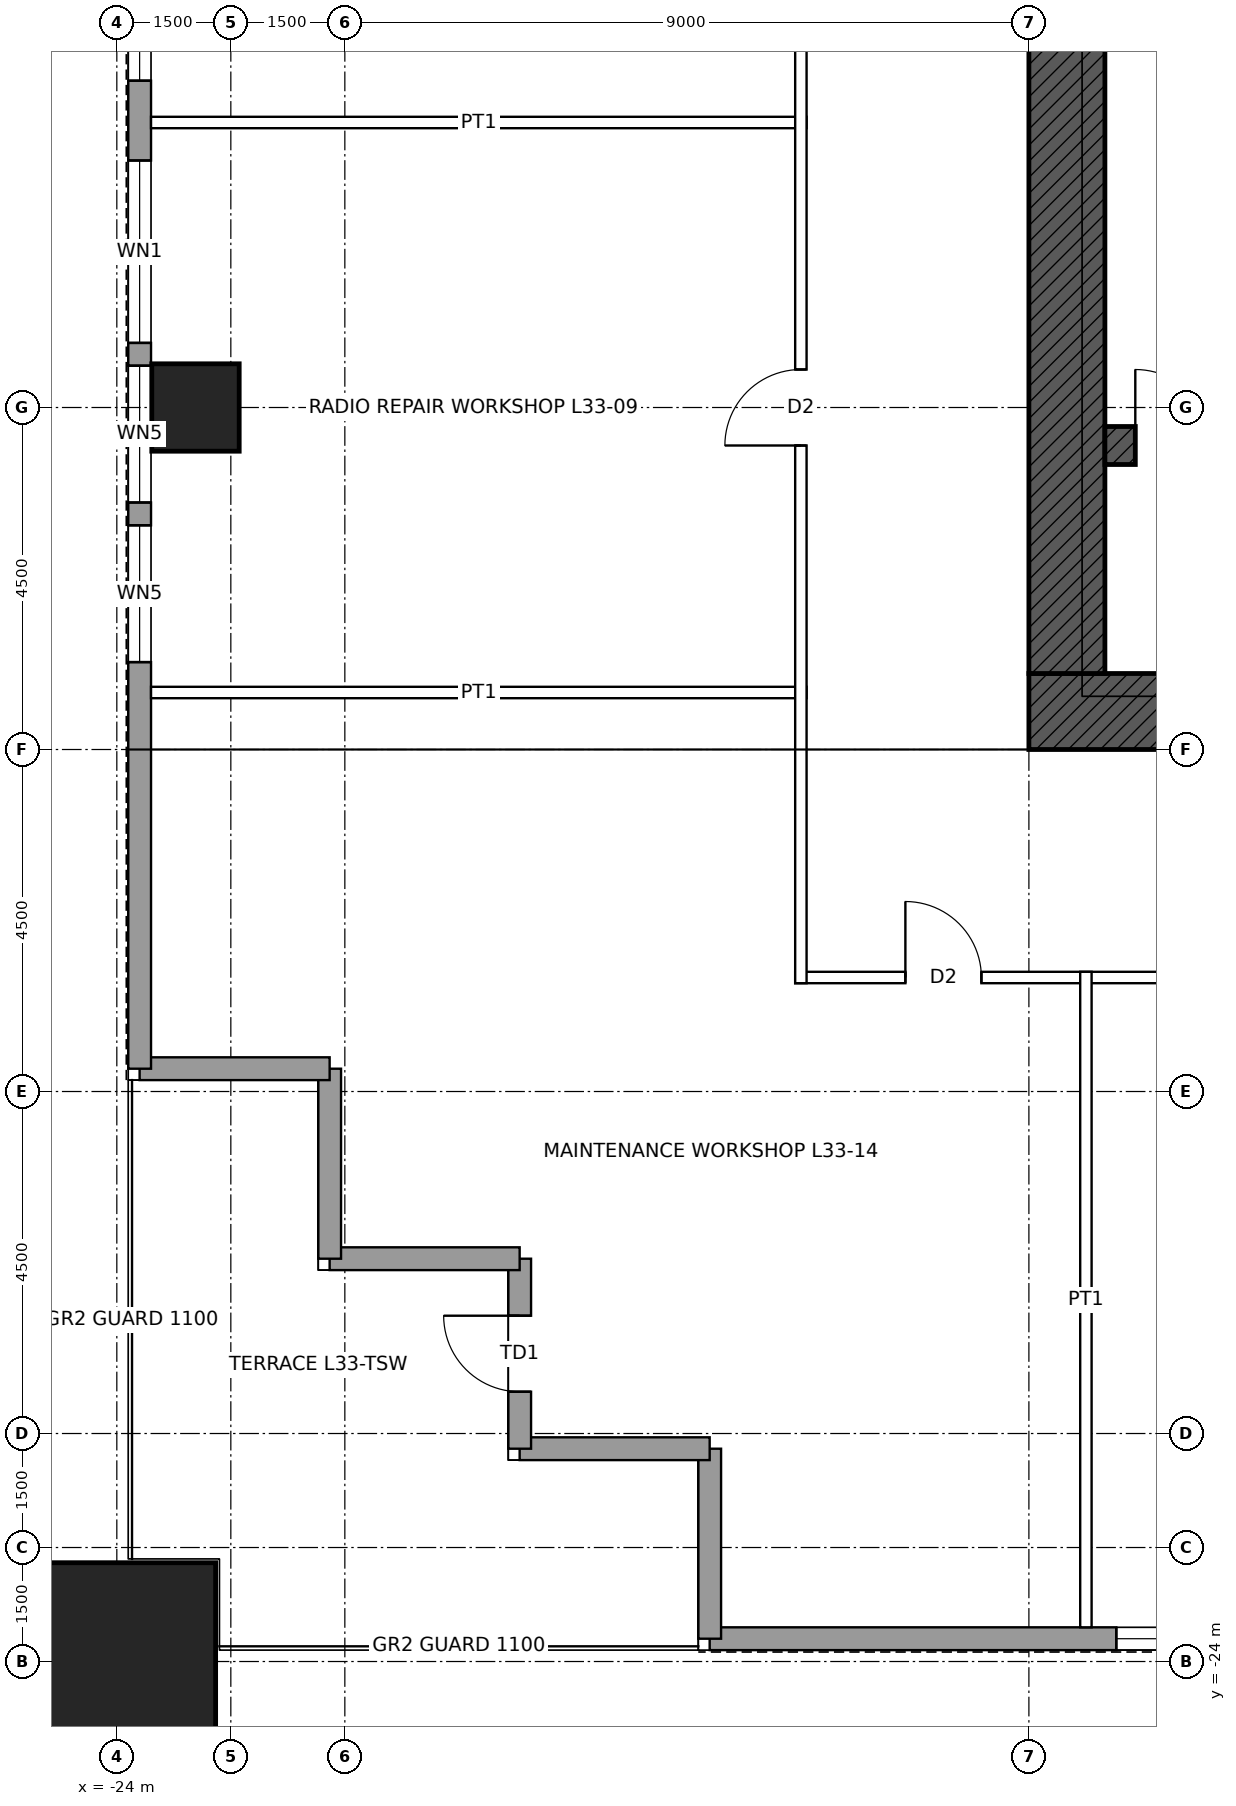
"""IFC4 building model, lengths in metres.
Left out: names, types, materials, properties, quantities, classifications, styles, units other than length and angle.
Written with IfcOpenShell. Run it as: python <this file> out.ifc"""

import sys

from ifc_helpers import new_model, si_unit, direction, frame, frame_2d, origin, origin_2d, place, context, subcontext, project, spatial, rectangle, hollow_rectangle, extrude, element, fill, save


model = new_model("IFC4")
c1 = context("Model", 3, precision=1e-05, world=origin(), true_north=direction((0.0, 1.0)))
c2 = subcontext(c1, "Body", "Model", "MODEL_VIEW")
j1 = project(units=[si_unit("LENGTHUNIT", "METRE"), si_unit("PLANEANGLEUNIT", "RADIAN")], contexts=[c1])
p1 = place(None, origin())
s1 = spatial("IfcSite", under=j1, at=p1, CompositionType="ELEMENT")
p2 = place(p1, origin())
s2 = spatial("IfcBuilding", under=s1, at=p2, CompositionType="ELEMENT")
p3 = place(p2, frame((0.0, 0.0, 162.9)))
s3 = spatial("IfcBuildingStorey", under=s2, at=p3, CompositionType="ELEMENT", Elevation=162.9)
p4 = place(p3, frame((-24.0, -24.0, 0.0), z_axis=(0.0, 0.0, 1.0), x_axis=(1.0, 0.0, 0.0)))
e1 = element("IfcColumn", 1, at=p4, inside=s3, PredefinedType="COLUMN", context=c2, shape_type="SweptSolid", body=[
    extrude(hollow_rectangle(XDim=2.6, YDim=2.6, WallThickness=0.13, at=origin_2d()), origin(), (0.0, 0.0, 1.0), 4.5),
])
p5 = place(p3, frame((-22.965, -7.5, 0.0), z_axis=(0.0, 0.0, 1.0), x_axis=(1.0, 0.0, 0.0)))
e2 = element("IfcColumn", 2, at=p5, inside=s3, PredefinedType="COLUMN", context=c2, shape_type="SweptSolid", body=[
    extrude(hollow_rectangle(XDim=1.15, YDim=1.15, WallThickness=0.075, at=origin_2d()), origin(), (0.0, 0.0, 1.0), 4.5),
])
p6 = place(p3, frame((12.0, -11.5, 0.0), z_axis=(0.0, 0.0, 1.0), x_axis=(-1.0, 0.0, 0.0)))
e3 = element("IfcWall", 3, at=p6, inside=s3, PredefinedType="SHEAR", context=c2, shape_type="SweptSolid", body=[
    extrude(rectangle(XDim=24.0, YDim=1.0, at=frame_2d((12.0, 0.0))), origin(), (0.0, 0.0, 1.0), 4.5),
])
p7 = place(p6, frame((11.5, 0.0, 0.0)))
e4 = element("IfcOpeningElement", 4, at=p7, cuts=e3, PredefinedType="OPENING", context=c2, shape_type="SweptSolid", body=[
    extrude(rectangle(XDim=1.0, YDim=2.1, at=frame_2d((0.5, 1.05))), frame((0.0, 0.51, 0.0), z_axis=(0.0, -1.0, 0.0), x_axis=(1.0, 0.0, 0.0)), (0.0, 0.0, 1.0), 1.02),
])
p8 = place(p6, frame((1.0, 0.0, 0.0)))
e5 = element("IfcOpeningElement", 5, at=p8, cuts=e3, PredefinedType="OPENING", context=c2, shape_type="SweptSolid", body=[
    extrude(rectangle(XDim=1.0, YDim=2.4, at=frame_2d((0.5, 1.2))), frame((0.0, 0.51, 0.0), z_axis=(0.0, -1.0, 0.0), x_axis=(1.0, 0.0, 0.0)), (0.0, 0.0, 1.0), 1.02),
])
p9 = place(p3, frame((-11.5, -11.0, 0.0), z_axis=(0.0, 0.0, 1.0), x_axis=(0.0, 1.0, 0.0)))
e6 = element("IfcWall", 6, at=p9, inside=s3, PredefinedType="SHEAR", context=c2, shape_type="SweptSolid", body=[
    extrude(rectangle(XDim=22.0, YDim=1.0, at=frame_2d((11.0, 0.0))), origin(), (0.0, 0.0, 1.0), 4.5),
])
p10 = place(p9, frame((10.5, 0.0, 0.0)))
e7 = element("IfcOpeningElement", 7, at=p10, cuts=e6, PredefinedType="OPENING", context=c2, shape_type="SweptSolid", body=[
    extrude(rectangle(XDim=1.0, YDim=2.4, at=frame_2d((0.5, 1.2))), frame((0.0, 0.51, 0.0), z_axis=(0.0, -1.0, 0.0), x_axis=(1.0, 0.0, 0.0)), (0.0, 0.0, 1.0), 1.02),
])
p11 = place(p3, frame((-11.0, -8.0, 0.0), z_axis=(0.0, 0.0, 1.0), x_axis=(1.0, 0.0, 0.0)))
e8 = element("IfcWall", 8, at=p11, inside=s3, PredefinedType="SHEAR", context=c2, shape_type="SweptSolid", body=[
    extrude(rectangle(XDim=2.0, YDim=0.5, at=frame_2d((1.0, 0.0))), origin(), (0.0, 0.0, 1.0), 4.5),
])
p12 = place(p11, frame((0.4, 0.0, 0.0)))
e9 = element("IfcOpeningElement", 9, at=p12, cuts=e8, PredefinedType="OPENING", context=c2, shape_type="SweptSolid", body=[
    extrude(rectangle(XDim=1.0, YDim=2.1, at=frame_2d((0.5, 1.05))), frame((0.0, 0.26, 0.0), z_axis=(0.0, -1.0, 0.0), x_axis=(1.0, 0.0, 0.0)), (0.0, 0.0, 1.0), 0.52),
])
p13 = place(p3, frame((16.2, -23.7, 0.0), z_axis=(0.0, 0.0, 1.0), x_axis=(-1.0, 0.0, 0.0)))
e10 = element("IfcWall", 10, at=p13, inside=s3, PredefinedType="SOLIDWALL", context=c2, shape_type="SweptSolid", body=[
    extrude(rectangle(XDim=32.4, YDim=0.3, at=frame_2d((16.2, 0.0))), origin(), (0.0, 0.0, 1.0), 4.3),
])
p14 = place(p13, frame((5.35, 0.0, 1.0)))
e11 = element("IfcOpeningElement", 11, at=p14, cuts=e10, PredefinedType="OPENING", context=c2, shape_type="SweptSolid", body=[
    extrude(rectangle(XDim=1.8, YDim=1.2, at=frame_2d((0.9, 0.6))), frame((0.0, 0.16, 0.0), z_axis=(0.0, -1.0, 0.0), x_axis=(1.0, 0.0, 0.0)), (0.0, 0.0, 1.0), 0.32),
])
p15 = place(p13, frame((7.45, 0.0, 1.0)))
e12 = element("IfcOpeningElement", 12, at=p15, cuts=e10, PredefinedType="OPENING", context=c2, shape_type="SweptSolid", body=[
    extrude(rectangle(XDim=1.8, YDim=1.2, at=frame_2d((0.9, 0.6))), frame((0.0, 0.16, 0.0), z_axis=(0.0, -1.0, 0.0), x_axis=(1.0, 0.0, 0.0)), (0.0, 0.0, 1.0), 0.32),
])
p16 = place(p13, frame((9.55, 0.0, 1.0)))
e13 = element("IfcOpeningElement", 13, at=p16, cuts=e10, PredefinedType="OPENING", context=c2, shape_type="SweptSolid", body=[
    extrude(rectangle(XDim=2.4, YDim=1.2, at=frame_2d((1.2, 0.6))), frame((0.0, 0.16, 0.0), z_axis=(0.0, -1.0, 0.0), x_axis=(1.0, 0.0, 0.0)), (0.0, 0.0, 1.0), 0.32),
])
p17 = place(p13, frame((13.0, 0.0, 1.0)))
e14 = element("IfcOpeningElement", 14, at=p17, cuts=e10, PredefinedType="OPENING", context=c2, shape_type="SweptSolid", body=[
    extrude(rectangle(XDim=2.4, YDim=1.2, at=frame_2d((1.2, 0.6))), frame((0.0, 0.16, 0.0), z_axis=(0.0, -1.0, 0.0), x_axis=(1.0, 0.0, 0.0)), (0.0, 0.0, 1.0), 0.32),
])
p18 = place(p13, frame((17.0, 0.0, 1.0)))
e15 = element("IfcOpeningElement", 15, at=p18, cuts=e10, PredefinedType="OPENING", context=c2, shape_type="SweptSolid", body=[
    extrude(rectangle(XDim=2.4, YDim=1.2, at=frame_2d((1.2, 0.6))), frame((0.0, 0.16, 0.0), z_axis=(0.0, -1.0, 0.0), x_axis=(1.0, 0.0, 0.0)), (0.0, 0.0, 1.0), 0.32),
])
p19 = place(p13, frame((20.45, 0.0, 1.0)))
e16 = element("IfcOpeningElement", 16, at=p19, cuts=e10, PredefinedType="OPENING", context=c2, shape_type="SweptSolid", body=[
    extrude(rectangle(XDim=2.4, YDim=1.2, at=frame_2d((1.2, 0.6))), frame((0.0, 0.16, 0.0), z_axis=(0.0, -1.0, 0.0), x_axis=(1.0, 0.0, 0.0)), (0.0, 0.0, 1.0), 0.32),
])
p20 = place(p13, frame((23.15, 0.0, 1.0)))
e17 = element("IfcOpeningElement", 17, at=p20, cuts=e10, PredefinedType="OPENING", context=c2, shape_type="SweptSolid", body=[
    extrude(rectangle(XDim=1.8, YDim=1.2, at=frame_2d((0.9, 0.6))), frame((0.0, 0.16, 0.0), z_axis=(0.0, -1.0, 0.0), x_axis=(1.0, 0.0, 0.0)), (0.0, 0.0, 1.0), 0.32),
])
p21 = place(p13, frame((25.25, 0.0, 1.0)))
e18 = element("IfcOpeningElement", 18, at=p21, cuts=e10, PredefinedType="OPENING", context=c2, shape_type="SweptSolid", body=[
    extrude(rectangle(XDim=1.8, YDim=1.2, at=frame_2d((0.9, 0.6))), frame((0.0, 0.16, 0.0), z_axis=(0.0, -1.0, 0.0), x_axis=(1.0, 0.0, 0.0)), (0.0, 0.0, 1.0), 0.32),
])
for number, where, z_axis, x_axis in (
    (19, (-16.2, -23.7, 0.0), (0.0, 0.0, 1.0), (0.0, 1.0, 0.0)),
    (20, (-16.2, -21.2, 0.0), (0.0, 0.0, 1.0), (-1.0, 0.0, 0.0)),
):
    element("IfcWall", number, at=place(p3, frame(where, z_axis=z_axis, x_axis=x_axis)), inside=s3, PredefinedType="SOLIDWALL", context=c2, shape_type="SweptSolid", body=[
        extrude(rectangle(XDim=2.5, YDim=0.3, at=frame_2d((1.25, 0.0))), origin(), (0.0, 0.0, 1.0), 4.3),
    ])
p22 = place(p3, frame((-18.7, -21.2, 0.0), z_axis=(0.0, 0.0, 1.0), x_axis=(0.0, 1.0, 0.0)))
e21 = element("IfcWall", 21, at=p22, inside=s3, PredefinedType="SOLIDWALL", context=c2, shape_type="SweptSolid", body=[
    extrude(rectangle(XDim=2.5, YDim=0.3, at=frame_2d((1.25, 0.0))), origin(), (0.0, 0.0, 1.0), 4.3),
])
p23 = place(p22, frame((0.75, 0.0, 0.0)))
e22 = element("IfcOpeningElement", 22, at=p23, cuts=e21, PredefinedType="OPENING", context=c2, shape_type="SweptSolid", body=[
    extrude(rectangle(XDim=1.0, YDim=2.4, at=frame_2d((0.5, 1.2))), frame((0.0, 0.16, 0.0), z_axis=(0.0, -1.0, 0.0), x_axis=(1.0, 0.0, 0.0)), (0.0, 0.0, 1.0), 0.32),
])
for number, where, z_axis, x_axis in (
    (23, (-18.7, -18.7, 0.0), (0.0, 0.0, 1.0), (-1.0, 0.0, 0.0)),
    (24, (-21.2, -18.7, 0.0), (0.0, 0.0, 1.0), (0.0, 1.0, 0.0)),
    (25, (-21.2, -16.2, 0.0), (0.0, 0.0, 1.0), (-1.0, 0.0, 0.0)),
):
    element("IfcWall", number, at=place(p3, frame(where, z_axis=z_axis, x_axis=x_axis)), inside=s3, PredefinedType="SOLIDWALL", context=c2, shape_type="SweptSolid", body=[
        extrude(rectangle(XDim=2.5, YDim=0.3, at=frame_2d((1.25, 0.0))), origin(), (0.0, 0.0, 1.0), 4.3),
    ])
p24 = place(p3, frame((-23.7, -16.2, 0.0), z_axis=(0.0, 0.0, 1.0), x_axis=(0.0, 1.0, 0.0)))
e26 = element("IfcWall", 26, at=p24, inside=s3, PredefinedType="SOLIDWALL", context=c2, shape_type="SweptSolid", body=[
    extrude(rectangle(XDim=32.4, YDim=0.3, at=frame_2d((16.2, 0.0))), origin(), (0.0, 0.0, 1.0), 4.3),
])
p25 = place(p24, frame((5.35, 0.0, 1.0)))
e27 = element("IfcOpeningElement", 27, at=p25, cuts=e26, PredefinedType="OPENING", context=c2, shape_type="SweptSolid", body=[
    extrude(rectangle(XDim=1.8, YDim=1.2, at=frame_2d((0.9, 0.6))), frame((0.0, 0.16, 0.0), z_axis=(0.0, -1.0, 0.0), x_axis=(1.0, 0.0, 0.0)), (0.0, 0.0, 1.0), 0.32),
])
p26 = place(p24, frame((7.45, 0.0, 1.0)))
e28 = element("IfcOpeningElement", 28, at=p26, cuts=e26, PredefinedType="OPENING", context=c2, shape_type="SweptSolid", body=[
    extrude(rectangle(XDim=1.8, YDim=1.2, at=frame_2d((0.9, 0.6))), frame((0.0, 0.16, 0.0), z_axis=(0.0, -1.0, 0.0), x_axis=(1.0, 0.0, 0.0)), (0.0, 0.0, 1.0), 0.32),
])
p27 = place(p24, frame((9.55, 0.0, 1.0)))
e29 = element("IfcOpeningElement", 29, at=p27, cuts=e26, PredefinedType="OPENING", context=c2, shape_type="SweptSolid", body=[
    extrude(rectangle(XDim=2.4, YDim=1.2, at=frame_2d((1.2, 0.6))), frame((0.0, 0.16, 0.0), z_axis=(0.0, -1.0, 0.0), x_axis=(1.0, 0.0, 0.0)), (0.0, 0.0, 1.0), 0.32),
])
p28 = place(p24, frame((13.0, 0.0, 1.0)))
e30 = element("IfcOpeningElement", 30, at=p28, cuts=e26, PredefinedType="OPENING", context=c2, shape_type="SweptSolid", body=[
    extrude(rectangle(XDim=2.4, YDim=1.2, at=frame_2d((1.2, 0.6))), frame((0.0, 0.16, 0.0), z_axis=(0.0, -1.0, 0.0), x_axis=(1.0, 0.0, 0.0)), (0.0, 0.0, 1.0), 0.32),
])
p29 = place(p24, frame((17.0, 0.0, 1.0)))
e31 = element("IfcOpeningElement", 31, at=p29, cuts=e26, PredefinedType="OPENING", context=c2, shape_type="SweptSolid", body=[
    extrude(rectangle(XDim=2.4, YDim=1.2, at=frame_2d((1.2, 0.6))), frame((0.0, 0.16, 0.0), z_axis=(0.0, -1.0, 0.0), x_axis=(1.0, 0.0, 0.0)), (0.0, 0.0, 1.0), 0.32),
])
p30 = place(p24, frame((20.45, 0.0, 1.0)))
e32 = element("IfcOpeningElement", 32, at=p30, cuts=e26, PredefinedType="OPENING", context=c2, shape_type="SweptSolid", body=[
    extrude(rectangle(XDim=2.4, YDim=1.2, at=frame_2d((1.2, 0.6))), frame((0.0, 0.16, 0.0), z_axis=(0.0, -1.0, 0.0), x_axis=(1.0, 0.0, 0.0)), (0.0, 0.0, 1.0), 0.32),
])
p31 = place(p24, frame((23.15, 0.0, 1.0)))
e33 = element("IfcOpeningElement", 33, at=p31, cuts=e26, PredefinedType="OPENING", context=c2, shape_type="SweptSolid", body=[
    extrude(rectangle(XDim=1.8, YDim=1.2, at=frame_2d((0.9, 0.6))), frame((0.0, 0.16, 0.0), z_axis=(0.0, -1.0, 0.0), x_axis=(1.0, 0.0, 0.0)), (0.0, 0.0, 1.0), 0.32),
])
p32 = place(p24, frame((25.25, 0.0, 1.0)))
e34 = element("IfcOpeningElement", 34, at=p32, cuts=e26, PredefinedType="OPENING", context=c2, shape_type="SweptSolid", body=[
    extrude(rectangle(XDim=1.8, YDim=1.2, at=frame_2d((0.9, 0.6))), frame((0.0, 0.16, 0.0), z_axis=(0.0, -1.0, 0.0), x_axis=(1.0, 0.0, 0.0)), (0.0, 0.0, 1.0), 0.32),
])
p33 = place(p3, frame((-15.075, -15.0, 0.0), z_axis=(0.0, 0.0, 1.0), x_axis=(1.0, 0.0, 0.0)))
e35 = element("IfcWall", 35, at=p33, inside=s3, PredefinedType="PARTITIONING", context=c2, shape_type="SweptSolid", body=[
    extrude(rectangle(XDim=30.15, YDim=0.15, at=frame_2d((15.075, 0.0))), origin(), (0.0, 0.0, 1.0), 4.3),
])
p34 = place(p33, frame((21.675, 0.0, 0.0)))
e36 = element("IfcOpeningElement", 36, at=p34, cuts=e35, PredefinedType="OPENING", context=c2, shape_type="SweptSolid", body=[
    extrude(rectangle(XDim=1.8, YDim=2.4, at=frame_2d((0.9, 1.2))), frame((0.0, 0.085, 0.0), z_axis=(0.0, -1.0, 0.0), x_axis=(1.0, 0.0, 0.0)), (0.0, 0.0, 1.0), 0.17),
])
p35 = place(p33, frame((14.575, 0.0, 0.0)))
e37 = element("IfcOpeningElement", 37, at=p35, cuts=e35, PredefinedType="OPENING", context=c2, shape_type="SweptSolid", body=[
    extrude(rectangle(XDim=1.0, YDim=2.1, at=frame_2d((0.5, 1.05))), frame((0.0, 0.085, 0.0), z_axis=(0.0, -1.0, 0.0), x_axis=(1.0, 0.0, 0.0)), (0.0, 0.0, 1.0), 0.17),
])
p36 = place(p33, frame((6.675, 0.0, 0.0)))
e38 = element("IfcOpeningElement", 38, at=p36, cuts=e35, PredefinedType="OPENING", context=c2, shape_type="SweptSolid", body=[
    extrude(rectangle(XDim=1.8, YDim=2.4, at=frame_2d((0.9, 1.2))), frame((0.0, 0.085, 0.0), z_axis=(0.0, -1.0, 0.0), x_axis=(1.0, 0.0, 0.0)), (0.0, 0.0, 1.0), 0.17),
])
p37 = place(p33, frame((27.7, 0.0, 0.0)))
e39 = element("IfcOpeningElement", 39, at=p37, cuts=e35, PredefinedType="OPENING", context=c2, shape_type="SweptSolid", body=[
    extrude(rectangle(XDim=1.0, YDim=2.1, at=frame_2d((0.5, 1.05))), frame((0.0, 0.085, 0.0), z_axis=(0.0, -1.0, 0.0), x_axis=(1.0, 0.0, 0.0)), (0.0, 0.0, 1.0), 0.17),
])
p38 = place(p33, frame((1.45, 0.0, 0.0)))
e40 = element("IfcOpeningElement", 40, at=p38, cuts=e35, PredefinedType="OPENING", context=c2, shape_type="SweptSolid", body=[
    extrude(rectangle(XDim=1.0, YDim=2.1, at=frame_2d((0.5, 1.05))), frame((0.0, 0.085, 0.0), z_axis=(0.0, -1.0, 0.0), x_axis=(1.0, 0.0, 0.0)), (0.0, 0.0, 1.0), 0.17),
])
for number, where, z_axis, x_axis in (
    (41, (-23.55, -11.25, 0.0), (0.0, 0.0, 1.0), (1.0, 0.0, 0.0)),
    (42, (-23.55, -3.75, 0.0), (0.0, 0.0, 1.0), (1.0, 0.0, 0.0)),
):
    element("IfcWall", number, at=place(p3, frame(where, z_axis=z_axis, x_axis=x_axis)), inside=s3, PredefinedType="PARTITIONING", context=c2, shape_type="SweptSolid", body=[
        extrude(rectangle(XDim=8.625, YDim=0.15, at=frame_2d((4.312, 0.0))), origin(), (0.0, 0.0, 1.0), 3.431),
    ])
p39 = place(p3, frame((-15.0, -15.075, 0.0), z_axis=(0.0, 0.0, 1.0), x_axis=(0.0, 1.0, 0.0)))
e43 = element("IfcWall", 43, at=p39, inside=s3, PredefinedType="PARTITIONING", context=c2, shape_type="SweptSolid", body=[
    extrude(rectangle(XDim=30.15, YDim=0.15, at=frame_2d((15.075, 0.0))), origin(), (0.0, 0.0, 1.0), 4.3),
])
p40 = place(p39, frame((7.075, 0.0, 0.0)))
e44 = element("IfcOpeningElement", 44, at=p40, cuts=e43, PredefinedType="OPENING", context=c2, shape_type="SweptSolid", body=[
    extrude(rectangle(XDim=1.0, YDim=2.1, at=frame_2d((0.5, 1.05))), frame((0.0, 0.085, 0.0), z_axis=(0.0, -1.0, 0.0), x_axis=(1.0, 0.0, 0.0)), (0.0, 0.0, 1.0), 0.17),
])
p41 = place(p39, frame((14.575, 0.0, 0.0)))
e45 = element("IfcOpeningElement", 45, at=p41, cuts=e43, PredefinedType="OPENING", context=c2, shape_type="SweptSolid", body=[
    extrude(rectangle(XDim=1.0, YDim=2.1, at=frame_2d((0.5, 1.05))), frame((0.0, 0.085, 0.0), z_axis=(0.0, -1.0, 0.0), x_axis=(1.0, 0.0, 0.0)), (0.0, 0.0, 1.0), 0.17),
])
p42 = place(p39, frame((21.675, 0.0, 0.0)))
e46 = element("IfcOpeningElement", 46, at=p42, cuts=e43, PredefinedType="OPENING", context=c2, shape_type="SweptSolid", body=[
    extrude(rectangle(XDim=1.8, YDim=2.4, at=frame_2d((0.9, 1.2))), frame((0.0, 0.085, 0.0), z_axis=(0.0, -1.0, 0.0), x_axis=(1.0, 0.0, 0.0)), (0.0, 0.0, 1.0), 0.17),
])
p43 = place(p3, frame((-11.25, -23.55, 0.0), z_axis=(0.0, 0.0, 1.0), x_axis=(0.0, 1.0, 0.0)))
e47 = element("IfcWall", 47, at=p43, inside=s3, PredefinedType="PARTITIONING", context=c2, shape_type="SweptSolid", body=[
    extrude(rectangle(XDim=8.625, YDim=0.15, at=frame_2d((4.312, 0.0))), origin(), (0.0, 0.0, 1.0), 3.431),
])
p44 = place(p21, origin())
e48 = element("IfcWindow", 48, at=p44, inside=s3, PartitioningType="SINGLE_PANEL", PredefinedType="WINDOW", context=c2, shape_type="SweptSolid", body=[
    extrude(rectangle(XDim=1.8, YDim=1.2, at=frame_2d((0.9, 0.6))), frame((0.0, 0.03, 0.0), z_axis=(0.0, -1.0, 0.0), x_axis=(1.0, 0.0, 0.0)), (0.0, 0.0, 1.0), 0.06),
])
fill(e18, e48)
p45 = place(p23, origin())
e49 = element("IfcDoor", 49, at=p45, inside=s3, OperationType="SINGLE_SWING_RIGHT", PredefinedType="DOOR", context=c2, shape_type="SweptSolid", body=[
    extrude(rectangle(XDim=1.0, YDim=2.4, at=frame_2d((0.5, 1.2))), frame((0.0, 0.025, 0.0), z_axis=(0.0, -1.0, 0.0), x_axis=(1.0, 0.0, 0.0)), (0.0, 0.0, 1.0), 0.05),
])
fill(e22, e49)
p46 = place(p25, origin())
e50 = element("IfcWindow", 50, at=p46, inside=s3, PartitioningType="SINGLE_PANEL", PredefinedType="WINDOW", context=c2, shape_type="SweptSolid", body=[
    extrude(rectangle(XDim=1.8, YDim=1.2, at=frame_2d((0.9, 0.6))), frame((0.0, 0.03, 0.0), z_axis=(0.0, -1.0, 0.0), x_axis=(1.0, 0.0, 0.0)), (0.0, 0.0, 1.0), 0.06),
])
fill(e27, e50)
p47 = place(p26, origin())
e51 = element("IfcWindow", 51, at=p47, inside=s3, PartitioningType="SINGLE_PANEL", PredefinedType="WINDOW", context=c2, shape_type="SweptSolid", body=[
    extrude(rectangle(XDim=1.8, YDim=1.2, at=frame_2d((0.9, 0.6))), frame((0.0, 0.03, 0.0), z_axis=(0.0, -1.0, 0.0), x_axis=(1.0, 0.0, 0.0)), (0.0, 0.0, 1.0), 0.06),
])
fill(e28, e51)
p48 = place(p27, origin())
e52 = element("IfcWindow", 52, at=p48, inside=s3, PartitioningType="SINGLE_PANEL", PredefinedType="WINDOW", context=c2, shape_type="SweptSolid", body=[
    extrude(rectangle(XDim=2.4, YDim=1.2, at=frame_2d((1.2, 0.6))), frame((0.0, 0.03, 0.0), z_axis=(0.0, -1.0, 0.0), x_axis=(1.0, 0.0, 0.0)), (0.0, 0.0, 1.0), 0.06),
])
fill(e29, e52)
p49 = place(p28, origin())
e53 = element("IfcWindow", 53, at=p49, inside=s3, PartitioningType="SINGLE_PANEL", PredefinedType="WINDOW", context=c2, shape_type="SweptSolid", body=[
    extrude(rectangle(XDim=2.4, YDim=1.2, at=frame_2d((1.2, 0.6))), frame((0.0, 0.03, 0.0), z_axis=(0.0, -1.0, 0.0), x_axis=(1.0, 0.0, 0.0)), (0.0, 0.0, 1.0), 0.06),
])
fill(e30, e53)
p50 = place(p12, origin())
e54 = element("IfcDoor", 54, at=p50, inside=s3, OperationType="SINGLE_SWING_LEFT", PredefinedType="DOOR", context=c2, shape_type="SweptSolid", body=[
    extrude(rectangle(XDim=1.0, YDim=2.1, at=frame_2d((0.5, 1.05))), frame((0.0, 0.025, 0.0), z_axis=(0.0, -1.0, 0.0), x_axis=(1.0, 0.0, 0.0)), (0.0, 0.0, 1.0), 0.05),
])
fill(e9, e54)
p51 = place(p40, origin())
e55 = element("IfcDoor", 55, at=p51, inside=s3, OperationType="SINGLE_SWING_LEFT", PredefinedType="DOOR", context=c2, shape_type="SweptSolid", body=[
    extrude(rectangle(XDim=1.0, YDim=2.1, at=frame_2d((0.5, 1.05))), frame((0.0, 0.025, 0.0), z_axis=(0.0, -1.0, 0.0), x_axis=(1.0, 0.0, 0.0)), (0.0, 0.0, 1.0), 0.05),
])
fill(e44, e55)
p52 = place(p38, origin())
e56 = element("IfcDoor", 56, at=p52, inside=s3, OperationType="SINGLE_SWING_LEFT", PredefinedType="DOOR", context=c2, shape_type="SweptSolid", body=[
    extrude(rectangle(XDim=1.0, YDim=2.1, at=frame_2d((0.5, 1.05))), frame((0.0, 0.025, 0.0), z_axis=(0.0, -1.0, 0.0), x_axis=(1.0, 0.0, 0.0)), (0.0, 0.0, 1.0), 0.05),
])
fill(e40, e56)
save(model, sys.argv[1])
